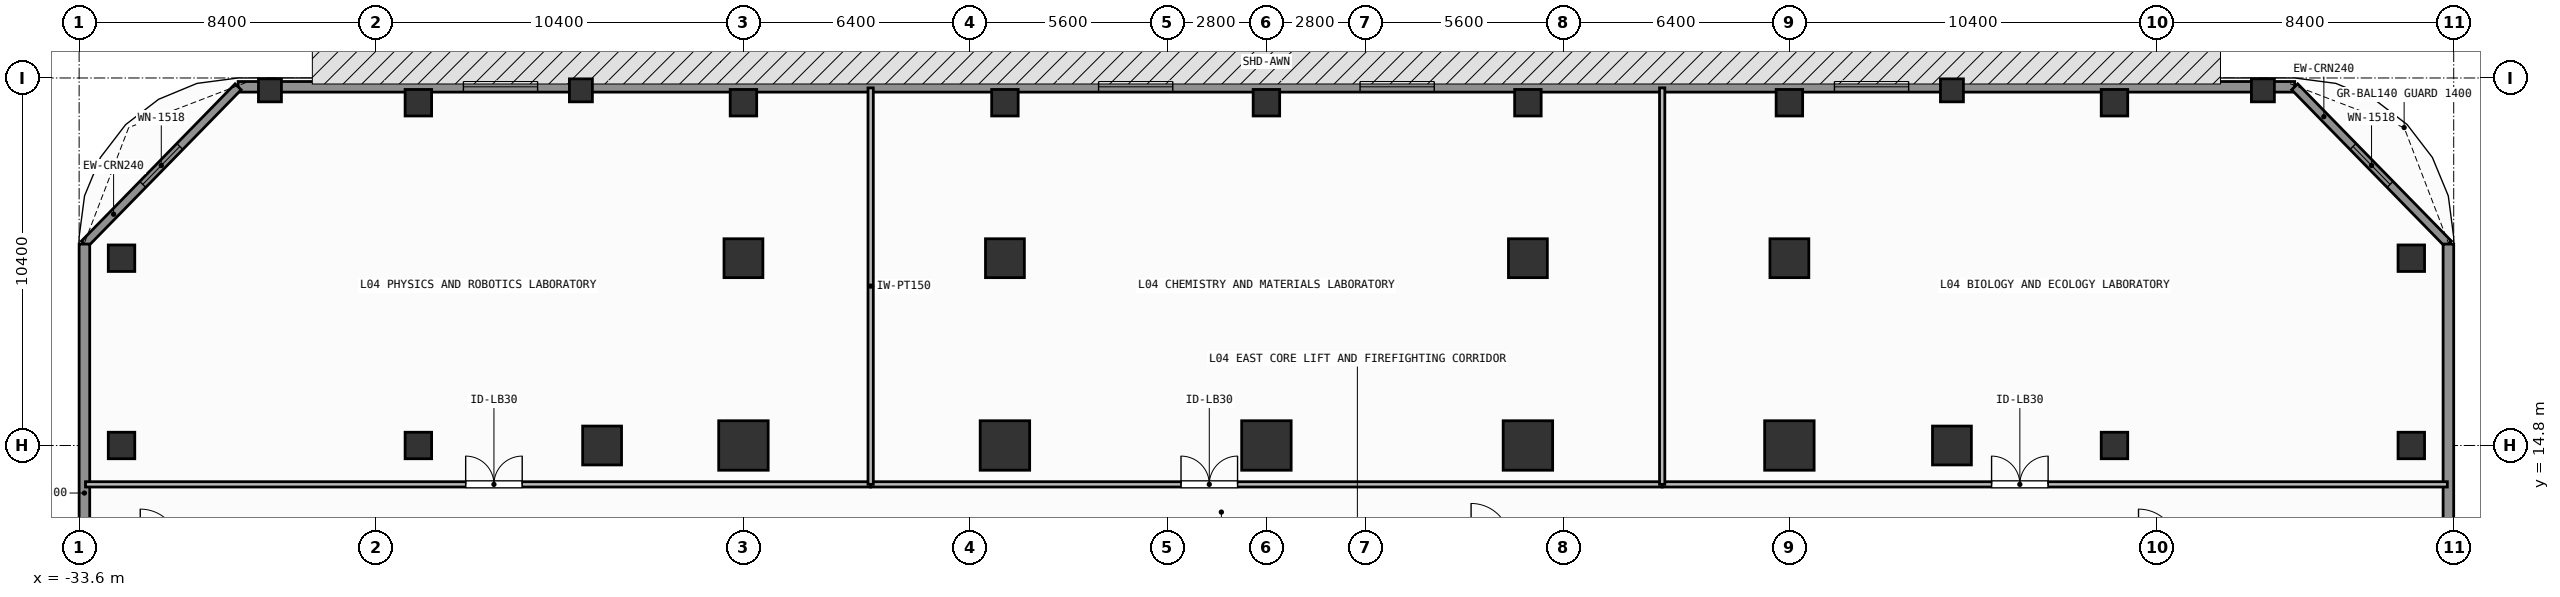
"""IFC4 building model, lengths in metres.
Left out: names, types, materials, properties, quantities, classifications, styles, units other than length and angle.
Written with IfcOpenShell. Run it as: python <this file> out.ifc"""

import sys

from ifc_helpers import new_model, si_unit, direction, frame, frame_2d, origin, origin_2d, place, context, subcontext, project, spatial, rectangle, extrude, element, fill, save


model = new_model("IFC4")
c1 = context("Model", 3, precision=1e-05, world=origin(), true_north=direction((0.0, 1.0)))
c2 = subcontext(c1, "Body", "Model", "MODEL_VIEW")
j1 = project(units=[si_unit("LENGTHUNIT", "METRE"), si_unit("PLANEANGLEUNIT", "RADIAN")], contexts=[c1])
p1 = place(None, origin())
s1 = spatial("IfcSite", under=j1, at=p1, CompositionType="ELEMENT")
p2 = place(p1, origin())
s2 = spatial("IfcBuilding", under=s1, at=p2, CompositionType="ELEMENT")
p3 = place(p2, frame((0.0, 0.0, 13.2)))
s3 = spatial("IfcBuildingStorey", under=s2, at=p3, CompositionType="ELEMENT", Elevation=13.2)
for number, where, z_axis, x_axis in (
    (1, (-14.8, 14.8, 0.0), (0.0, 0.0, 1.0), (1.0, 0.0, 0.0)),
    (2, (-7.4, 14.8, 0.0), (0.0, 0.0, 1.0), (1.0, 0.0, 0.0)),
    (3, (0.0, 14.8, 0.0), (0.0, 0.0, 1.0), (1.0, 0.0, 0.0)),
    (4, (7.4, 14.8, 0.0), (0.0, 0.0, 1.0), (1.0, 0.0, 0.0)),
    (5, (14.8, 14.8, 0.0), (0.0, 0.0, 1.0), (1.0, 0.0, 0.0)),
):
    element("IfcColumn", number, at=place(p3, frame(where, z_axis=z_axis, x_axis=x_axis)), inside=s3, PredefinedType="COLUMN", context=c2, shape_type="SweptSolid", body=[
        extrude(rectangle(XDim=1.4, YDim=1.4, at=origin_2d()), origin(), (0.0, 0.0, 1.0), 4.2),
    ])
for number, where, z_axis, x_axis in (
    (6, (-18.8, 14.8, 0.0), (0.0, 0.0, 1.0), (1.0, 0.0, 0.0)),
    (7, (19.4, 14.8, 0.0), (0.0, 0.0, 1.0), (1.0, 0.0, 0.0)),
    (8, (-14.8, 20.1, 0.0), (0.0, 0.0, 1.0), (1.0, 0.0, 0.0)),
    (9, (-7.4, 20.1, 0.0), (0.0, 0.0, 1.0), (1.0, 0.0, 0.0)),
    (10, (7.4, 20.1, 0.0), (0.0, 0.0, 1.0), (1.0, 0.0, 0.0)),
    (11, (14.8, 20.1, 0.0), (0.0, 0.0, 1.0), (1.0, 0.0, 0.0)),
):
    element("IfcColumn", number, at=place(p3, frame(where, z_axis=z_axis, x_axis=x_axis)), inside=s3, PredefinedType="COLUMN", context=c2, shape_type="SweptSolid", body=[
        extrude(rectangle(XDim=1.1, YDim=1.1, at=origin_2d()), origin(), (0.0, 0.0, 1.0), 4.2),
    ])
for number, where, z_axis, x_axis in (
    (12, (-32.4, 14.8, 0.0), (0.0, 0.0, 1.0), (1.0, 0.0, 0.0)),
    (13, (-24.0, 14.8, 0.0), (0.0, 0.0, 1.0), (1.0, 0.0, 0.0)),
    (14, (-24.0, 24.5, 0.0), (0.0, 0.0, 1.0), (1.0, 0.0, 0.0)),
    (15, (-14.8, 24.5, 0.0), (0.0, 0.0, 1.0), (1.0, 0.0, 0.0)),
    (16, (-7.4, 24.5, 0.0), (0.0, 0.0, 1.0), (1.0, 0.0, 0.0)),
    (17, (0.0, 24.5, 0.0), (0.0, 0.0, 1.0), (1.0, 0.0, 0.0)),
    (18, (7.4, 24.5, 0.0), (0.0, 0.0, 1.0), (1.0, 0.0, 0.0)),
    (19, (14.8, 24.5, 0.0), (0.0, 0.0, 1.0), (1.0, 0.0, 0.0)),
    (20, (24.0, 14.8, 0.0), (0.0, 0.0, 1.0), (1.0, 0.0, 0.0)),
    (21, (24.0, 24.5, 0.0), (0.0, 0.0, 1.0), (1.0, 0.0, 0.0)),
    (22, (32.4, 14.8, 0.0), (0.0, 0.0, 1.0), (1.0, 0.0, 0.0)),
    (23, (-32.4, 20.1, 0.0), (0.0, 0.0, 1.0), (1.0, 0.0, 0.0)),
    (24, (32.4, 20.1, 0.0), (0.0, 0.0, 1.0), (1.0, 0.0, 0.0)),
):
    element("IfcColumn", number, at=place(p3, frame(where, z_axis=z_axis, x_axis=x_axis)), inside=s3, PredefinedType="COLUMN", context=c2, shape_type="SweptSolid", body=[
        extrude(rectangle(XDim=0.75, YDim=0.75, at=origin_2d()), origin(), (0.0, 0.0, 1.0), 4.2),
    ])
for number, where, z_axis, x_axis in (
    (25, (-28.2, 24.85, 0.0), (0.0, 0.0, 1.0), (1.0, 0.0, 0.0)),
    (26, (-19.4, 24.85, 0.0), (0.0, 0.0, 1.0), (1.0, 0.0, 0.0)),
    (27, (19.4, 24.85, 0.0), (0.0, 0.0, 1.0), (1.0, 0.0, 0.0)),
    (28, (28.2, 24.85, 0.0), (0.0, 0.0, 1.0), (1.0, 0.0, 0.0)),
):
    element("IfcColumn", number, at=place(p3, frame(where, z_axis=z_axis, x_axis=x_axis)), inside=s3, PredefinedType="PILASTER", context=c2, shape_type="SweptSolid", body=[
        extrude(rectangle(XDim=0.65, YDim=0.65, at=origin_2d()), origin(), (0.0, 0.0, 1.0), 4.2),
    ])
p4 = place(p3, frame((-29.1, 24.95, 0.0), z_axis=(0.0, 0.0, 1.0), x_axis=(1.0, 0.0, 0.0)))
e29 = element("IfcWall", 29, at=p4, inside=s3, PredefinedType="SOLIDWALL", context=c2, shape_type="SweptSolid", body=[
    extrude(rectangle(XDim=58.2, YDim=0.3, at=frame_2d((29.1, 0.0))), origin(), (0.0, 0.0, 1.0), 3.96),
])
p5 = place(p4, frame((6.375, 0.0, 0.85)))
e30 = element("IfcOpeningElement", 30, at=p5, cuts=e29, PredefinedType="OPENING", context=c2, shape_type="SweptSolid", body=[
    extrude(rectangle(XDim=2.1, YDim=2.2, at=frame_2d((1.05, 1.1))), frame((0.0, 0.16, 0.0), z_axis=(0.0, -1.0, 0.0), x_axis=(1.0, 0.0, 0.0)), (0.0, 0.0, 1.0), 0.32),
])
p6 = place(p4, frame((24.35, 0.0, 0.85)))
e31 = element("IfcOpeningElement", 31, at=p6, cuts=e29, PredefinedType="OPENING", context=c2, shape_type="SweptSolid", body=[
    extrude(rectangle(XDim=2.1, YDim=2.2, at=frame_2d((1.05, 1.1))), frame((0.0, 0.16, 0.0), z_axis=(0.0, -1.0, 0.0), x_axis=(1.0, 0.0, 0.0)), (0.0, 0.0, 1.0), 0.32),
])
p7 = place(p4, frame((31.75, 0.0, 0.85)))
e32 = element("IfcOpeningElement", 32, at=p7, cuts=e29, PredefinedType="OPENING", context=c2, shape_type="SweptSolid", body=[
    extrude(rectangle(XDim=2.1, YDim=2.2, at=frame_2d((1.05, 1.1))), frame((0.0, 0.16, 0.0), z_axis=(0.0, -1.0, 0.0), x_axis=(1.0, 0.0, 0.0)), (0.0, 0.0, 1.0), 0.32),
])
p8 = place(p4, frame((45.175, 0.0, 0.85)))
e33 = element("IfcOpeningElement", 33, at=p8, cuts=e29, PredefinedType="OPENING", context=c2, shape_type="SweptSolid", body=[
    extrude(rectangle(XDim=2.1, YDim=2.2, at=frame_2d((1.05, 1.1))), frame((0.0, 0.16, 0.0), z_axis=(0.0, -1.0, 0.0), x_axis=(1.0, 0.0, 0.0)), (0.0, 0.0, 1.0), 0.32),
])
p9 = place(p3, frame((-33.45, 20.5, 0.0), z_axis=(0.0, 0.0, 1.0), x_axis=(0.69901822973, 0.715103848756, 0.0)))
e34 = element("IfcWall", 34, at=p9, inside=s3, PredefinedType="SOLIDWALL", context=c2, shape_type="SweptSolid", body=[
    extrude(rectangle(XDim=6.223, YDim=0.24, at=frame_2d((3.111, 0.0))), origin(), (0.0, 0.0, 1.0), 3.96),
])
p10 = place(p9, frame((2.362, 0.0, 0.85)))
e35 = element("IfcOpeningElement", 35, at=p10, cuts=e34, PredefinedType="OPENING", context=c2, shape_type="SweptSolid", body=[
    extrude(rectangle(XDim=1.5, YDim=1.85, at=frame_2d((0.75, 0.925))), frame((0.0, 0.13, 0.0), z_axis=(0.0, -1.0, 0.0), x_axis=(1.0, 0.0, 0.0)), (0.0, 0.0, 1.0), 0.26),
])
p11 = place(p3, frame((29.1, 24.95, 0.0), z_axis=(0.0, 0.0, 1.0), x_axis=(0.69901822973, -0.715103848756, 0.0)))
e36 = element("IfcWall", 36, at=p11, inside=s3, PredefinedType="SOLIDWALL", context=c2, shape_type="SweptSolid", body=[
    extrude(rectangle(XDim=6.223, YDim=0.24, at=frame_2d((3.111, 0.0))), origin(), (0.0, 0.0, 1.0), 3.96),
])
p12 = place(p11, frame((2.362, 0.0, 0.85)))
e37 = element("IfcOpeningElement", 37, at=p12, cuts=e36, PredefinedType="OPENING", context=c2, shape_type="SweptSolid", body=[
    extrude(rectangle(XDim=1.5, YDim=1.85, at=frame_2d((0.75, 0.925))), frame((0.0, 0.13, 0.0), z_axis=(0.0, -1.0, 0.0), x_axis=(1.0, 0.0, 0.0)), (0.0, 0.0, 1.0), 0.26),
])
for number, where, z_axis, x_axis in (
    (38, (-33.45, 6.41, 0.0), (0.0, 0.0, 1.0), (0.0, 1.0, 0.0)),
    (39, (33.45, 6.41, 0.0), (0.0, 0.0, 1.0), (0.0, 1.0, 0.0)),
):
    element("IfcWall", number, at=place(p3, frame(where, z_axis=z_axis, x_axis=x_axis)), inside=s3, PredefinedType="SOLIDWALL", context=c2, shape_type="SweptSolid", body=[
        extrude(rectangle(XDim=14.09, YDim=0.3, at=frame_2d((7.045, 0.0))), origin(), (0.0, 0.0, 1.0), 3.96),
    ])
p13 = place(p3, frame((-33.42, 13.7, 0.0), z_axis=(0.0, 0.0, 1.0), x_axis=(1.0, 0.0, 0.0)))
e40 = element("IfcWall", 40, at=p13, inside=s3, PredefinedType="PARTITIONING", context=c2, shape_type="SweptSolid", body=[
    extrude(rectangle(XDim=22.22, YDim=0.15, at=frame_2d((11.11, 0.0))), origin(), (0.0, 0.0, 1.0), 3.96),
])
p14 = place(p13, frame((10.759, 0.0, 0.0)))
e41 = element("IfcOpeningElement", 41, at=p14, cuts=e40, PredefinedType="OPENING", context=c2, shape_type="SweptSolid", body=[
    extrude(rectangle(XDim=1.6, YDim=2.3, at=frame_2d((0.8, 1.15))), frame((0.0, 0.085, 0.0), z_axis=(0.0, -1.0, 0.0), x_axis=(1.0, 0.0, 0.0)), (0.0, 0.0, 1.0), 0.17),
])
p15 = place(p3, frame((-11.2, 13.7, 0.0), z_axis=(0.0, 0.0, 1.0), x_axis=(1.0, 0.0, 0.0)))
e42 = element("IfcWall", 42, at=p15, inside=s3, PredefinedType="PARTITIONING", context=c2, shape_type="SweptSolid", body=[
    extrude(rectangle(XDim=22.4, YDim=0.15, at=frame_2d((11.2, 0.0))), origin(), (0.0, 0.0, 1.0), 3.96),
])
p16 = place(p15, frame((8.783, 0.0, 0.0)))
e43 = element("IfcOpeningElement", 43, at=p16, cuts=e42, PredefinedType="OPENING", context=c2, shape_type="SweptSolid", body=[
    extrude(rectangle(XDim=1.6, YDim=2.3, at=frame_2d((0.8, 1.15))), frame((0.0, 0.085, 0.0), z_axis=(0.0, -1.0, 0.0), x_axis=(1.0, 0.0, 0.0)), (0.0, 0.0, 1.0), 0.17),
])
p17 = place(p3, frame((11.2, 13.7, 0.0), z_axis=(0.0, 0.0, 1.0), x_axis=(1.0, 0.0, 0.0)))
e44 = element("IfcWall", 44, at=p17, inside=s3, PredefinedType="PARTITIONING", context=c2, shape_type="SweptSolid", body=[
    extrude(rectangle(XDim=22.22, YDim=0.15, at=frame_2d((11.11, 0.0))), origin(), (0.0, 0.0, 1.0), 3.96),
])
p18 = place(p17, frame((9.322, 0.0, 0.0)))
e45 = element("IfcOpeningElement", 45, at=p18, cuts=e44, PredefinedType="OPENING", context=c2, shape_type="SweptSolid", body=[
    extrude(rectangle(XDim=1.6, YDim=2.3, at=frame_2d((0.8, 1.15))), frame((0.0, 0.085, 0.0), z_axis=(0.0, -1.0, 0.0), x_axis=(1.0, 0.0, 0.0)), (0.0, 0.0, 1.0), 0.17),
])
for number, where, z_axis, x_axis in (
    (46, (-11.2, 13.7, 0.0), (0.0, 0.0, 1.0), (0.0, 1.0, 0.0)),
    (47, (11.2, 13.7, 0.0), (0.0, 0.0, 1.0), (0.0, 1.0, 0.0)),
):
    element("IfcWall", number, at=place(p3, frame(where, z_axis=z_axis, x_axis=x_axis)), inside=s3, PredefinedType="PARTITIONING", context=c2, shape_type="SweptSolid", body=[
        extrude(rectangle(XDim=11.22, YDim=0.15, at=frame_2d((5.61, 0.0))), origin(), (0.0, 0.0, 1.0), 3.96),
    ])
p19 = place(p10, origin())
e48 = element("IfcWindow", 48, at=p19, inside=s3, PartitioningType="SINGLE_PANEL", PredefinedType="WINDOW", context=c2, shape_type="SweptSolid", body=[
    extrude(rectangle(XDim=1.5, YDim=1.85, at=frame_2d((0.75, 0.925))), frame((0.0, 0.03, 0.0), z_axis=(0.0, -1.0, 0.0), x_axis=(1.0, 0.0, 0.0)), (0.0, 0.0, 1.0), 0.06),
])
fill(e35, e48)
p20 = place(p12, origin())
e49 = element("IfcWindow", 49, at=p20, inside=s3, PartitioningType="SINGLE_PANEL", PredefinedType="WINDOW", context=c2, shape_type="SweptSolid", body=[
    extrude(rectangle(XDim=1.5, YDim=1.85, at=frame_2d((0.75, 0.925))), frame((0.0, 0.03, 0.0), z_axis=(0.0, -1.0, 0.0), x_axis=(1.0, 0.0, 0.0)), (0.0, 0.0, 1.0), 0.06),
])
fill(e37, e49)
p21 = place(p5, origin())
e50 = element("IfcWindow", 50, at=p21, inside=s3, PartitioningType="SINGLE_PANEL", PredefinedType="WINDOW", context=c2, shape_type="SweptSolid", body=[
    extrude(rectangle(XDim=2.1, YDim=2.2, at=frame_2d((1.05, 1.1))), frame((0.0, 0.03, 0.0), z_axis=(0.0, -1.0, 0.0), x_axis=(1.0, 0.0, 0.0)), (0.0, 0.0, 1.0), 0.06),
])
fill(e30, e50)
p22 = place(p6, origin())
e51 = element("IfcWindow", 51, at=p22, inside=s3, PartitioningType="SINGLE_PANEL", PredefinedType="WINDOW", context=c2, shape_type="SweptSolid", body=[
    extrude(rectangle(XDim=2.1, YDim=2.2, at=frame_2d((1.05, 1.1))), frame((0.0, 0.03, 0.0), z_axis=(0.0, -1.0, 0.0), x_axis=(1.0, 0.0, 0.0)), (0.0, 0.0, 1.0), 0.06),
])
fill(e31, e51)
p23 = place(p7, origin())
e52 = element("IfcWindow", 52, at=p23, inside=s3, PartitioningType="SINGLE_PANEL", PredefinedType="WINDOW", context=c2, shape_type="SweptSolid", body=[
    extrude(rectangle(XDim=2.1, YDim=2.2, at=frame_2d((1.05, 1.1))), frame((0.0, 0.03, 0.0), z_axis=(0.0, -1.0, 0.0), x_axis=(1.0, 0.0, 0.0)), (0.0, 0.0, 1.0), 0.06),
])
fill(e32, e52)
p24 = place(p8, origin())
e53 = element("IfcWindow", 53, at=p24, inside=s3, PartitioningType="SINGLE_PANEL", PredefinedType="WINDOW", context=c2, shape_type="SweptSolid", body=[
    extrude(rectangle(XDim=2.1, YDim=2.2, at=frame_2d((1.05, 1.1))), frame((0.0, 0.03, 0.0), z_axis=(0.0, -1.0, 0.0), x_axis=(1.0, 0.0, 0.0)), (0.0, 0.0, 1.0), 0.06),
])
fill(e33, e53)
p25 = place(p14, origin())
e54 = element("IfcDoor", 54, at=p25, inside=s3, OperationType="SINGLE_SWING_LEFT", PredefinedType="DOOR", context=c2, shape_type="SweptSolid", body=[
    extrude(rectangle(XDim=1.6, YDim=2.3, at=frame_2d((0.8, 1.15))), frame((0.0, 0.025, 0.0), z_axis=(0.0, -1.0, 0.0), x_axis=(1.0, 0.0, 0.0)), (0.0, 0.0, 1.0), 0.05),
])
fill(e41, e54)
p26 = place(p16, origin())
e55 = element("IfcDoor", 55, at=p26, inside=s3, OperationType="SINGLE_SWING_LEFT", PredefinedType="DOOR", context=c2, shape_type="SweptSolid", body=[
    extrude(rectangle(XDim=1.6, YDim=2.3, at=frame_2d((0.8, 1.15))), frame((0.0, 0.025, 0.0), z_axis=(0.0, -1.0, 0.0), x_axis=(1.0, 0.0, 0.0)), (0.0, 0.0, 1.0), 0.05),
])
fill(e43, e55)
p27 = place(p18, origin())
e56 = element("IfcDoor", 56, at=p27, inside=s3, OperationType="SINGLE_SWING_LEFT", PredefinedType="DOOR", context=c2, shape_type="SweptSolid", body=[
    extrude(rectangle(XDim=1.6, YDim=2.3, at=frame_2d((0.8, 1.15))), frame((0.0, 0.025, 0.0), z_axis=(0.0, -1.0, 0.0), x_axis=(1.0, 0.0, 0.0)), (0.0, 0.0, 1.0), 0.05),
])
fill(e45, e56)
save(model, sys.argv[1])
